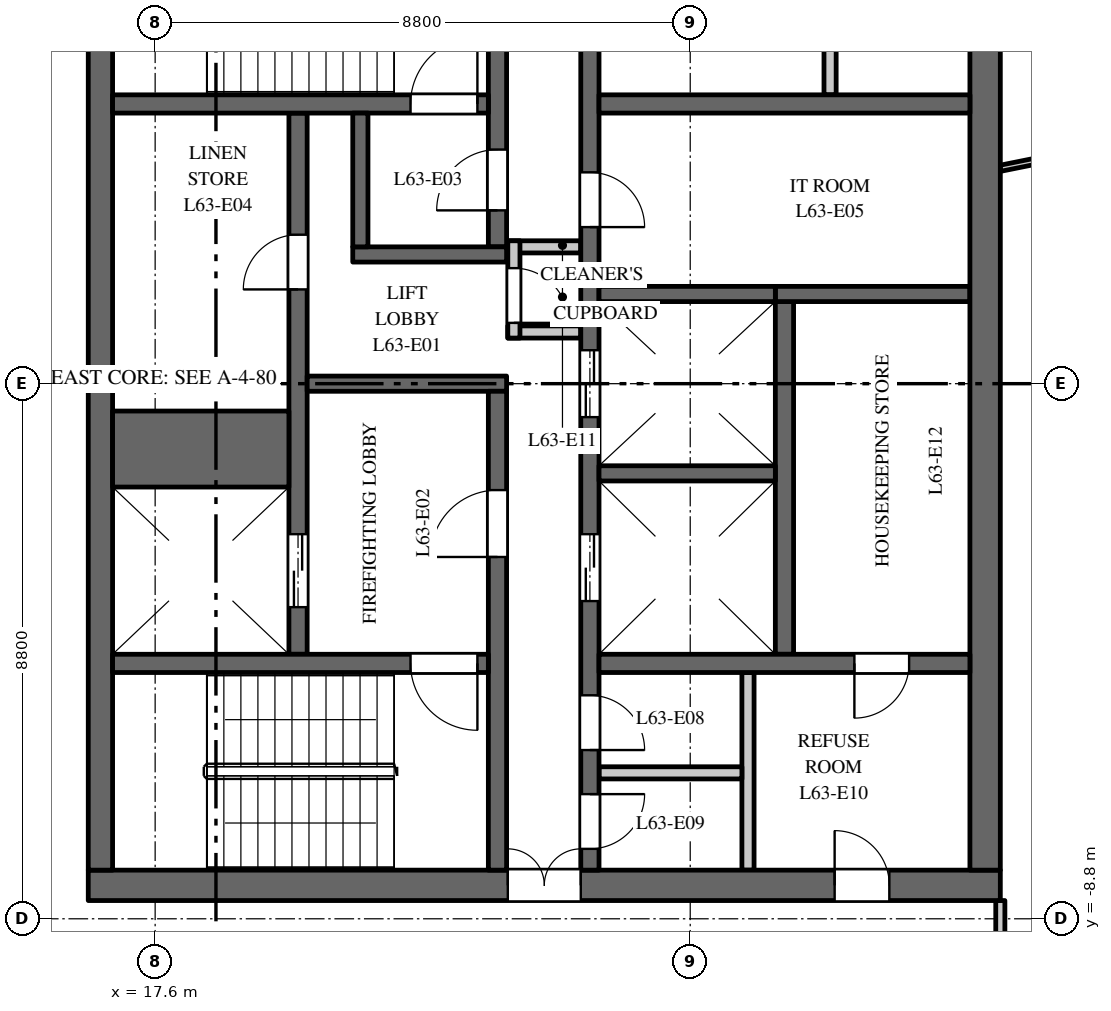
"""IFC4 building model, lengths in metres.
Left out: names, types, materials, properties, quantities, classifications, styles, units other than length and angle.
Written with IfcOpenShell. Run it as: python <this file> out.ifc"""

import sys

from ifc_helpers import new_model, si_unit, direction, frame, frame_2d, origin, place, context, subcontext, project, spatial, rectangle, extrude, element, fill, save


model = new_model("IFC4")
c1 = context("Model", 3, precision=1e-05, world=origin(), true_north=direction((0.0, 1.0)))
c2 = subcontext(c1, "Body", "Model", "MODEL_VIEW")
j1 = project(units=[si_unit("LENGTHUNIT", "METRE"), si_unit("PLANEANGLEUNIT", "RADIAN")], contexts=[c1])
p1 = place(None, origin())
s1 = spatial("IfcSite", under=j1, at=p1, CompositionType="ELEMENT")
p2 = place(p1, origin())
s2 = spatial("IfcBuilding", under=s1, at=p2, CompositionType="ELEMENT")
p3 = place(p2, frame((0.0, 0.0, 295.0)))
s3 = spatial("IfcBuildingStorey", under=s2, at=p3, CompositionType="ELEMENT", Elevation=295.0)
p4 = place(p3, frame((16.5, -8.25, 0.0), z_axis=(0.0, 0.0, 1.0), x_axis=(1.0, 0.0, 0.0)))
e1 = element("IfcWall", 1, at=p4, inside=s3, PredefinedType="SHEAR", context=c2, shape_type="SweptSolid", body=[
    extrude(rectangle(XDim=15.0, YDim=0.5, at=frame_2d((7.5, 0.0))), origin(), (0.0, 0.0, 1.0), 3.7),
])
p5 = place(p4, frame((6.9, 0.0, 0.0)))
e2 = element("IfcOpeningElement", 2, at=p5, cuts=e1, PredefinedType="OPENING", context=c2, shape_type="SweptSolid", body=[
    extrude(rectangle(XDim=1.2, YDim=2.1, at=frame_2d((0.6, 1.05))), frame((0.0, 0.26, 0.0), z_axis=(0.0, -1.0, 0.0), x_axis=(1.0, 0.0, 0.0)), (0.0, 0.0, 1.0), 0.52),
])
p6 = place(p4, frame((12.275, 0.0, 0.0)))
e3 = element("IfcOpeningElement", 3, at=p6, cuts=e1, PredefinedType="OPENING", context=c2, shape_type="SweptSolid", body=[
    extrude(rectangle(XDim=0.9, YDim=2.1, at=frame_2d((0.45, 1.05))), frame((0.0, 0.26, 0.0), z_axis=(0.0, -1.0, 0.0), x_axis=(1.0, 0.0, 0.0)), (0.0, 0.0, 1.0), 0.52),
])
p7 = place(p3, frame((27.95, -4.45, 0.0), z_axis=(0.0, 0.0, 1.0), x_axis=(0.0, 1.0, 0.0)))
e4 = element("IfcWall", 4, at=p7, inside=s3, PredefinedType="SHEAR", context=c2, shape_type="SweptSolid", body=[
    extrude(rectangle(XDim=5.8, YDim=0.3, at=frame_2d((2.9, 0.0))), origin(), (0.0, 0.0, 1.0), 3.7),
])
p8 = place(p3, frame((27.8, 1.475, 0.0), z_axis=(0.0, 0.0, 1.0), x_axis=(1.0, 0.0, 0.0)))
e5 = element("IfcWall", 5, at=p8, inside=s3, PredefinedType="SHEAR", context=c2, shape_type="SweptSolid", body=[
    extrude(rectangle(XDim=3.2, YDim=0.25, at=frame_2d((1.6, 0.0))), origin(), (0.0, 0.0, 1.0), 3.7),
])
p9 = place(p3, frame((19.95, -4.45, 0.0), z_axis=(0.0, 0.0, 1.0), x_axis=(0.0, 1.0, 0.0)))
e6 = element("IfcWall", 6, at=p9, inside=s3, PredefinedType="SHEAR", context=c2, shape_type="SweptSolid", body=[
    extrude(rectangle(XDim=8.9, YDim=0.3, at=frame_2d((4.45, 0.0))), origin(), (0.0, 0.0, 1.0), 3.7),
])
p10 = place(p9, frame((0.775, 0.0, 0.0)))
e7 = element("IfcOpeningElement", 7, at=p10, cuts=e6, PredefinedType="OPENING", context=c2, shape_type="SweptSolid", body=[
    extrude(rectangle(XDim=1.2, YDim=2.1, at=frame_2d((0.6, 1.05))), frame((0.0, 0.16, 0.0), z_axis=(0.0, -1.0, 0.0), x_axis=(1.0, 0.0, 0.0)), (0.0, 0.0, 1.0), 0.32),
])
p11 = place(p9, frame((6.0, 0.0, 0.0)))
e8 = element("IfcOpeningElement", 8, at=p11, cuts=e6, PredefinedType="OPENING", context=c2, shape_type="SweptSolid", body=[
    extrude(rectangle(XDim=0.9, YDim=2.1, at=frame_2d((0.45, 1.05))), frame((0.0, 0.16, 0.0), z_axis=(0.0, -1.0, 0.0), x_axis=(1.0, 0.0, 0.0)), (0.0, 0.0, 1.0), 0.32),
])
p12 = place(p3, frame((24.75, -8.0, 0.0), z_axis=(0.0, 0.0, 1.0), x_axis=(0.0, 1.0, 0.0)))
e9 = element("IfcWall", 9, at=p12, inside=s3, PredefinedType="SHEAR", context=c2, shape_type="SweptSolid", body=[
    extrude(rectangle(XDim=16.0, YDim=0.3, at=frame_2d((8.0, 0.0))), origin(), (0.0, 0.0, 1.0), 3.7),
])
p13 = place(p12, frame((4.425, 0.0, 0.0)))
e10 = element("IfcOpeningElement", 10, at=p13, cuts=e9, PredefinedType="OPENING", context=c2, shape_type="SweptSolid", body=[
    extrude(rectangle(XDim=1.1, YDim=2.1, at=frame_2d((0.55, 1.05))), frame((0.0, 0.16, 0.0), z_axis=(0.0, -1.0, 0.0), x_axis=(1.0, 0.0, 0.0)), (0.0, 0.0, 1.0), 0.32),
])
p14 = place(p12, frame((7.45, 0.0, 0.0)))
e11 = element("IfcOpeningElement", 11, at=p14, cuts=e9, PredefinedType="OPENING", context=c2, shape_type="SweptSolid", body=[
    extrude(rectangle(XDim=1.1, YDim=2.1, at=frame_2d((0.55, 1.05))), frame((0.0, 0.16, 0.0), z_axis=(0.0, -1.0, 0.0), x_axis=(1.0, 0.0, 0.0)), (0.0, 0.0, 1.0), 0.32),
])
p15 = place(p12, frame((10.575, 0.0, 0.0)))
e12 = element("IfcOpeningElement", 12, at=p15, cuts=e9, PredefinedType="OPENING", context=c2, shape_type="SweptSolid", body=[
    extrude(rectangle(XDim=0.9, YDim=2.1, at=frame_2d((0.45, 1.05))), frame((0.0, 0.16, 0.0), z_axis=(0.0, -1.0, 0.0), x_axis=(1.0, 0.0, 0.0)), (0.0, 0.0, 1.0), 0.32),
])
p16 = place(p12, frame((13.75, 0.0, 0.0)))
e13 = element("IfcOpeningElement", 13, at=p16, cuts=e9, PredefinedType="OPENING", context=c2, shape_type="SweptSolid", body=[
    extrude(rectangle(XDim=0.9, YDim=2.1, at=frame_2d((0.45, 1.05))), frame((0.0, 0.16, 0.0), z_axis=(0.0, -1.0, 0.0), x_axis=(1.0, 0.0, 0.0)), (0.0, 0.0, 1.0), 0.32),
])
p17 = place(p12, frame((1.975, 0.0, 0.0)))
e14 = element("IfcOpeningElement", 14, at=p17, cuts=e9, PredefinedType="OPENING", context=c2, shape_type="SweptSolid", body=[
    extrude(rectangle(XDim=0.9, YDim=2.1, at=frame_2d((0.45, 1.05))), frame((0.0, 0.16, 0.0), z_axis=(0.0, -1.0, 0.0), x_axis=(1.0, 0.0, 0.0)), (0.0, 0.0, 1.0), 0.32),
])
p18 = place(p12, frame((0.35, 0.0, 0.0)))
e15 = element("IfcOpeningElement", 15, at=p18, cuts=e9, PredefinedType="OPENING", context=c2, shape_type="SweptSolid", body=[
    extrude(rectangle(XDim=0.9, YDim=2.1, at=frame_2d((0.45, 1.05))), frame((0.0, 0.16, 0.0), z_axis=(0.0, -1.0, 0.0), x_axis=(1.0, 0.0, 0.0)), (0.0, 0.0, 1.0), 0.32),
])
p19 = place(p3, frame((20.1, 0.0, 0.0), z_axis=(0.0, 0.0, 1.0), x_axis=(1.0, 0.0, 0.0)))
e16 = element("IfcWall", 16, at=p19, inside=s3, PredefinedType="SHEAR", context=c2, shape_type="SweptSolid", body=[
    extrude(rectangle(XDim=3.28, YDim=0.25, at=frame_2d((1.64, 0.0))), origin(), (0.0, 0.0, 1.0), 3.7),
])
p20 = place(p3, frame((16.7, -8.0, 0.0), z_axis=(0.0, 0.0, 1.0), x_axis=(0.0, 1.0, 0.0)))
e17 = element("IfcWall", 17, at=p20, inside=s3, PredefinedType="SHEAR", context=c2, shape_type="SweptSolid", body=[
    extrude(rectangle(XDim=16.0, YDim=0.4, at=frame_2d((8.0, 0.0))), origin(), (0.0, 0.0, 1.0), 3.7),
])
for number, where, z_axis, x_axis in (
    (18, (23.4, 0.85, 0.0), (0.0, 0.0, 1.0), (1.0, 0.0, 0.0)),
    (19, (23.4, 2.25, 0.0), (0.0, 0.0, 1.0), (1.0, 0.0, 0.0)),
):
    element("IfcWall", number, at=place(p3, frame(where, z_axis=z_axis, x_axis=x_axis)), inside=s3, PredefinedType="PARTITIONING", context=c2, shape_type="SweptSolid", body=[
        extrude(rectangle(XDim=1.2, YDim=0.2, at=frame_2d((0.6, 0.0))), origin(), (0.0, 0.0, 1.0), 3.7),
    ])
p21 = place(p3, frame((23.5, 0.75, 0.0), z_axis=(0.0, 0.0, 1.0), x_axis=(0.0, 1.0, 0.0)))
e20 = element("IfcWall", 20, at=p21, inside=s3, PredefinedType="PARTITIONING", context=c2, shape_type="SweptSolid", body=[
    extrude(rectangle(XDim=1.6, YDim=0.2, at=frame_2d((0.8, 0.0))), origin(), (0.0, 0.0, 1.0), 3.7),
])
p22 = place(p21, frame((0.25, 0.0, 0.0)))
e21 = element("IfcOpeningElement", 21, at=p22, cuts=e20, PredefinedType="OPENING", context=c2, shape_type="SweptSolid", body=[
    extrude(rectangle(XDim=0.9, YDim=2.1, at=frame_2d((0.45, 1.05))), frame((0.0, 0.11, 0.0), z_axis=(0.0, -1.0, 0.0), x_axis=(1.0, 0.0, 0.0)), (0.0, 0.0, 1.0), 0.22),
])
p23 = place(p3, frame((31.25, -8.0, 0.0), z_axis=(0.0, 0.0, 1.0), x_axis=(0.0, 1.0, 0.0)))
e22 = element("IfcWall", 22, at=p23, inside=s3, PredefinedType="SHEAR", context=c2, shape_type="SweptSolid", body=[
    extrude(rectangle(XDim=16.0, YDim=0.5, at=frame_2d((8.0, 0.0))), origin(), (0.0, 0.0, 1.0), 3.7),
])
p24 = place(p3, frame((24.9, 4.6, 0.0), z_axis=(0.0, 0.0, 1.0), x_axis=(1.0, 0.0, 0.0)))
e23 = element("IfcWall", 23, at=p24, inside=s3, PredefinedType="SHEAR", context=c2, shape_type="SweptSolid", body=[
    extrude(rectangle(XDim=6.1, YDim=0.3, at=frame_2d((3.05, 0.0))), origin(), (0.0, 0.0, 1.0), 3.7),
])
for number, where, z_axis, x_axis in (
    (24, (28.7, 4.75, 0.0), (0.0, 0.0, 1.0), (0.0, 1.0, 0.0)),
    (25, (27.35, -8.0, 0.0), (0.0, 0.0, 1.0), (0.0, 1.0, 0.0)),
):
    element("IfcWall", number, at=place(p3, frame(where, z_axis=z_axis, x_axis=x_axis)), inside=s3, PredefinedType="PARTITIONING", context=c2, shape_type="SweptSolid", body=[
        extrude(rectangle(XDim=3.25, YDim=0.2, at=frame_2d((1.625, 0.0))), origin(), (0.0, 0.0, 1.0), 3.7),
    ])
p25 = place(p3, frame((24.9, -6.4, 0.0), z_axis=(0.0, 0.0, 1.0), x_axis=(1.0, 0.0, 0.0)))
e26 = element("IfcWall", 26, at=p25, inside=s3, PredefinedType="PARTITIONING", context=c2, shape_type="SweptSolid", body=[
    extrude(rectangle(XDim=2.35, YDim=0.2, at=frame_2d((1.175, 0.0))), origin(), (0.0, 0.0, 1.0), 3.7),
])
p26 = place(p3, frame((24.9, -4.6, 0.0), z_axis=(0.0, 0.0, 1.0), x_axis=(1.0, 0.0, 0.0)))
e27 = element("IfcWall", 27, at=p26, inside=s3, PredefinedType="SHEAR", context=c2, shape_type="SweptSolid", body=[
    extrude(rectangle(XDim=6.1, YDim=0.3, at=frame_2d((3.05, 0.0))), origin(), (0.0, 0.0, 1.0), 3.7),
])
p27 = place(p26, frame((4.2, 0.0, 0.0)))
e28 = element("IfcOpeningElement", 28, at=p27, cuts=e27, PredefinedType="OPENING", context=c2, shape_type="SweptSolid", body=[
    extrude(rectangle(XDim=0.9, YDim=2.1, at=frame_2d((0.45, 1.05))), frame((0.0, 0.16, 0.0), z_axis=(0.0, -1.0, 0.0), x_axis=(1.0, 0.0, 0.0)), (0.0, 0.0, 1.0), 0.32),
])
p28 = place(p3, frame((16.9, -1.075, 0.0), z_axis=(0.0, 0.0, 1.0), x_axis=(1.0, 0.0, 0.0)))
e29 = element("IfcWall", 29, at=p28, inside=s3, PredefinedType="SHEAR", context=c2, shape_type="SweptSolid", body=[
    extrude(rectangle(XDim=2.9, YDim=1.25, at=frame_2d((1.45, 0.0))), origin(), (0.0, 0.0, 1.0), 3.7),
])
for number, where, z_axis, x_axis in (
    (30, (24.9, -1.475, 0.0), (0.0, 0.0, 1.0), (1.0, 0.0, 0.0)),
    (31, (24.9, 1.475, 0.0), (0.0, 0.0, 1.0), (1.0, 0.0, 0.0)),
):
    element("IfcWall", number, at=place(p3, frame(where, z_axis=z_axis, x_axis=x_axis)), inside=s3, PredefinedType="SHEAR", context=c2, shape_type="SweptSolid", body=[
        extrude(rectangle(XDim=2.9, YDim=0.25, at=frame_2d((1.45, 0.0))), origin(), (0.0, 0.0, 1.0), 3.7),
    ])
p29 = place(p3, frame((23.23, 2.25, 0.0), z_axis=(0.0, 0.0, 1.0), x_axis=(0.0, 1.0, 0.0)))
e32 = element("IfcWall", 32, at=p29, inside=s3, PredefinedType="SHEAR", context=c2, shape_type="SweptSolid", body=[
    extrude(rectangle(XDim=5.75, YDim=0.3, at=frame_2d((2.875, 0.0))), origin(), (0.0, 0.0, 1.0), 3.7),
])
p30 = place(p29, frame((0.6, 0.0, 0.0)))
e33 = element("IfcOpeningElement", 33, at=p30, cuts=e32, PredefinedType="OPENING", context=c2, shape_type="SweptSolid", body=[
    extrude(rectangle(XDim=1.0, YDim=2.1, at=frame_2d((0.5, 1.05))), frame((0.0, 0.16, 0.0), z_axis=(0.0, -1.0, 0.0), x_axis=(1.0, 0.0, 0.0)), (0.0, 0.0, 1.0), 0.32),
])
p31 = place(p3, frame((23.23, -8.0, 0.0), z_axis=(0.0, 0.0, 1.0), x_axis=(0.0, 1.0, 0.0)))
e34 = element("IfcWall", 34, at=p31, inside=s3, PredefinedType="SHEAR", context=c2, shape_type="SweptSolid", body=[
    extrude(rectangle(XDim=7.875, YDim=0.3, at=frame_2d((3.938, 0.0))), origin(), (0.0, 0.0, 1.0), 3.7),
])
p32 = place(p31, frame((5.15, 0.0, 0.0)))
e35 = element("IfcOpeningElement", 35, at=p32, cuts=e34, PredefinedType="OPENING", context=c2, shape_type="SweptSolid", body=[
    extrude(rectangle(XDim=1.1, YDim=2.1, at=frame_2d((0.55, 1.05))), frame((0.0, 0.16, 0.0), z_axis=(0.0, -1.0, 0.0), x_axis=(1.0, 0.0, 0.0)), (0.0, 0.0, 1.0), 0.32),
])
p33 = place(p3, frame((16.9, 4.6, 0.0), z_axis=(0.0, 0.0, 1.0), x_axis=(1.0, 0.0, 0.0)))
e36 = element("IfcWall", 36, at=p33, inside=s3, PredefinedType="SHEAR", context=c2, shape_type="SweptSolid", body=[
    extrude(rectangle(XDim=6.18, YDim=0.3, at=frame_2d((3.09, 0.0))), origin(), (0.0, 0.0, 1.0), 3.7),
])
p34 = place(p33, frame((4.9, 0.0, 0.0)))
e37 = element("IfcOpeningElement", 37, at=p34, cuts=e36, PredefinedType="OPENING", context=c2, shape_type="SweptSolid", body=[
    extrude(rectangle(XDim=1.1, YDim=2.1, at=frame_2d((0.55, 1.05))), frame((0.0, 0.16, 0.0), z_axis=(0.0, -1.0, 0.0), x_axis=(1.0, 0.0, 0.0)), (0.0, 0.0, 1.0), 0.32),
])
p35 = place(p3, frame((16.9, -4.6, 0.0), z_axis=(0.0, 0.0, 1.0), x_axis=(1.0, 0.0, 0.0)))
e38 = element("IfcWall", 38, at=p35, inside=s3, PredefinedType="SHEAR", context=c2, shape_type="SweptSolid", body=[
    extrude(rectangle(XDim=6.18, YDim=0.3, at=frame_2d((3.09, 0.0))), origin(), (0.0, 0.0, 1.0), 3.7),
])
p36 = place(p35, frame((4.9, 0.0, 0.0)))
e39 = element("IfcOpeningElement", 39, at=p36, cuts=e38, PredefinedType="OPENING", context=c2, shape_type="SweptSolid", body=[
    extrude(rectangle(XDim=1.1, YDim=2.1, at=frame_2d((0.55, 1.05))), frame((0.0, 0.16, 0.0), z_axis=(0.0, -1.0, 0.0), x_axis=(1.0, 0.0, 0.0)), (0.0, 0.0, 1.0), 0.32),
])
p37 = place(p3, frame((20.85, 2.125, 0.0), z_axis=(0.0, 0.0, 1.0), x_axis=(1.0, 0.0, 0.0)))
e40 = element("IfcWall", 40, at=p37, inside=s3, PredefinedType="SHEAR", context=c2, shape_type="SweptSolid", body=[
    extrude(rectangle(XDim=2.53, YDim=0.25, at=frame_2d((1.265, 0.0))), origin(), (0.0, 0.0, 1.0), 3.7),
])
p38 = place(p3, frame((20.975, 2.25, 0.0), z_axis=(0.0, 0.0, 1.0), x_axis=(0.0, 1.0, 0.0)))
e41 = element("IfcWall", 41, at=p38, inside=s3, PredefinedType="SHEAR", context=c2, shape_type="SweptSolid", body=[
    extrude(rectangle(XDim=2.2, YDim=0.25, at=frame_2d((1.1, 0.0))), origin(), (0.0, 0.0, 1.0), 3.7),
])
p39 = place(p3, frame((31.5, -11.5, 0.0), z_axis=(0.0, 0.0, 1.0), x_axis=(0.0, 1.0, 0.0)))
e42 = element("IfcWall", 42, at=p39, inside=s3, PredefinedType="PARTITIONING", context=c2, shape_type="SweptSolid", body=[
    extrude(rectangle(XDim=3.0, YDim=0.15, at=frame_2d((1.5, 0.0))), origin(), (0.0, 0.0, 1.0), 3.0),
])
p40 = place(p39, frame((0.65, 0.0, 0.0)))
e43 = element("IfcOpeningElement", 43, at=p40, cuts=e42, PredefinedType="OPENING", context=c2, shape_type="SweptSolid", body=[
    extrude(rectangle(XDim=1.0, YDim=2.1, at=frame_2d((0.5, 1.05))), frame((0.0, 0.085, 0.0), z_axis=(0.0, -1.0, 0.0), x_axis=(1.0, 0.0, 0.0)), (0.0, 0.0, 1.0), 0.17),
])
p41 = place(p3, frame((31.5, 3.542, 0.0), z_axis=(0.0, 0.0, 1.0), x_axis=(0.980357474535, 0.197228857227, 0.0)))
e44 = element("IfcWall", 44, at=p41, inside=s3, PredefinedType="PARTITIONING", context=c2, shape_type="SweptSolid", body=[
    extrude(rectangle(XDim=4.092, YDim=0.1, at=frame_2d((2.046, 0.0))), origin(), (0.0, 0.0, 1.0), 3.0),
])
p42 = place(p10, origin())
e45 = element("IfcDoor", 45, at=p42, inside=s3, OperationType="DOUBLE_DOOR_SLIDING", PredefinedType="DOOR", context=c2, shape_type="SweptSolid", body=[
    extrude(rectangle(XDim=1.2, YDim=2.1, at=frame_2d((0.6, 1.05))), frame((0.0, 0.025, 0.0), z_axis=(0.0, -1.0, 0.0), x_axis=(1.0, 0.0, 0.0)), (0.0, 0.0, 1.0), 0.05),
])
fill(e7, e45)
p43 = place(p13, origin())
e46 = element("IfcDoor", 46, at=p43, inside=s3, OperationType="DOUBLE_DOOR_SLIDING", PredefinedType="DOOR", context=c2, shape_type="SweptSolid", body=[
    extrude(rectangle(XDim=1.1, YDim=2.1, at=frame_2d((0.55, 1.05))), frame((0.0, 0.025, 0.0), z_axis=(0.0, -1.0, 0.0), x_axis=(1.0, 0.0, 0.0)), (0.0, 0.0, 1.0), 0.05),
])
fill(e10, e46)
p44 = place(p14, origin())
e47 = element("IfcDoor", 47, at=p44, inside=s3, OperationType="DOUBLE_DOOR_SLIDING", PredefinedType="DOOR", context=c2, shape_type="SweptSolid", body=[
    extrude(rectangle(XDim=1.1, YDim=2.1, at=frame_2d((0.55, 1.05))), frame((0.0, 0.025, 0.0), z_axis=(0.0, -1.0, 0.0), x_axis=(1.0, 0.0, 0.0)), (0.0, 0.0, 1.0), 0.05),
])
fill(e11, e47)
p45 = place(p34, origin())
e48 = element("IfcDoor", 48, at=p45, inside=s3, OperationType="SINGLE_SWING_LEFT", PredefinedType="DOOR", context=c2, shape_type="SweptSolid", body=[
    extrude(rectangle(XDim=1.1, YDim=2.1, at=frame_2d((0.55, 1.05))), frame((0.0, 0.025, 0.0), z_axis=(0.0, -1.0, 0.0), x_axis=(1.0, 0.0, 0.0)), (0.0, 0.0, 1.0), 0.05),
])
fill(e37, e48)
p46 = place(p36, origin())
e49 = element("IfcDoor", 49, at=p46, inside=s3, OperationType="SINGLE_SWING_RIGHT", PredefinedType="DOOR", context=c2, shape_type="SweptSolid", body=[
    extrude(rectangle(XDim=1.1, YDim=2.1, at=frame_2d((0.55, 1.05))), frame((0.0, 0.025, 0.0), z_axis=(0.0, -1.0, 0.0), x_axis=(1.0, 0.0, 0.0)), (0.0, 0.0, 1.0), 0.05),
])
fill(e39, e49)
p47 = place(p32, origin())
e50 = element("IfcDoor", 50, at=p47, inside=s3, OperationType="SINGLE_SWING_RIGHT", PredefinedType="DOOR", context=c2, shape_type="SweptSolid", body=[
    extrude(rectangle(XDim=1.1, YDim=2.1, at=frame_2d((0.55, 1.05))), frame((0.0, 0.025, 0.0), z_axis=(0.0, -1.0, 0.0), x_axis=(1.0, 0.0, 0.0)), (0.0, 0.0, 1.0), 0.05),
])
fill(e35, e50)
p48 = place(p30, origin())
e51 = element("IfcDoor", 51, at=p48, inside=s3, OperationType="SINGLE_SWING_RIGHT", PredefinedType="DOOR", context=c2, shape_type="SweptSolid", body=[
    extrude(rectangle(XDim=1.0, YDim=2.1, at=frame_2d((0.5, 1.05))), frame((0.0, 0.025, 0.0), z_axis=(0.0, -1.0, 0.0), x_axis=(1.0, 0.0, 0.0)), (0.0, 0.0, 1.0), 0.05),
])
fill(e33, e51)
p49 = place(p5, origin())
e52 = element("IfcDoor", 52, at=p49, inside=s3, OperationType="DOUBLE_DOOR_DOUBLE_SWING", PredefinedType="DOOR", context=c2, shape_type="SweptSolid", body=[
    extrude(rectangle(XDim=1.2, YDim=2.1, at=frame_2d((0.6, 1.05))), frame((0.0, 0.025, 0.0), z_axis=(0.0, -1.0, 0.0), x_axis=(1.0, 0.0, 0.0)), (0.0, 0.0, 1.0), 0.05),
])
fill(e2, e52)
p50 = place(p11, origin())
e53 = element("IfcDoor", 53, at=p50, inside=s3, OperationType="SINGLE_SWING_RIGHT", PredefinedType="DOOR", context=c2, shape_type="SweptSolid", body=[
    extrude(rectangle(XDim=0.9, YDim=2.1, at=frame_2d((0.45, 1.05))), frame((0.0, 0.025, 0.0), z_axis=(0.0, -1.0, 0.0), x_axis=(1.0, 0.0, 0.0)), (0.0, 0.0, 1.0), 0.05),
])
fill(e8, e53)
p51 = place(p15, origin())
e54 = element("IfcDoor", 54, at=p51, inside=s3, OperationType="SINGLE_SWING_LEFT", PredefinedType="DOOR", context=c2, shape_type="SweptSolid", body=[
    extrude(rectangle(XDim=0.9, YDim=2.1, at=frame_2d((0.45, 1.05))), frame((0.0, 0.025, 0.0), z_axis=(0.0, -1.0, 0.0), x_axis=(1.0, 0.0, 0.0)), (0.0, 0.0, 1.0), 0.05),
])
fill(e12, e54)
p52 = place(p17, origin())
e55 = element("IfcDoor", 55, at=p52, inside=s3, OperationType="SINGLE_SWING_LEFT", PredefinedType="DOOR", context=c2, shape_type="SweptSolid", body=[
    extrude(rectangle(XDim=0.9, YDim=2.1, at=frame_2d((0.45, 1.05))), frame((0.0, 0.025, 0.0), z_axis=(0.0, -1.0, 0.0), x_axis=(1.0, 0.0, 0.0)), (0.0, 0.0, 1.0), 0.05),
])
fill(e14, e55)
p53 = place(p18, origin())
e56 = element("IfcDoor", 56, at=p53, inside=s3, OperationType="SINGLE_SWING_RIGHT", PredefinedType="DOOR", context=c2, shape_type="SweptSolid", body=[
    extrude(rectangle(XDim=0.9, YDim=2.1, at=frame_2d((0.45, 1.05))), frame((0.0, 0.025, 0.0), z_axis=(0.0, -1.0, 0.0), x_axis=(1.0, 0.0, 0.0)), (0.0, 0.0, 1.0), 0.05),
])
fill(e15, e56)
p54 = place(p6, origin())
e57 = element("IfcDoor", 57, at=p54, inside=s3, OperationType="SINGLE_SWING_RIGHT", PredefinedType="DOOR", context=c2, shape_type="SweptSolid", body=[
    extrude(rectangle(XDim=0.9, YDim=2.1, at=frame_2d((0.45, 1.05))), frame((0.0, 0.025, 0.0), z_axis=(0.0, -1.0, 0.0), x_axis=(1.0, 0.0, 0.0)), (0.0, 0.0, 1.0), 0.05),
])
fill(e3, e57)
p55 = place(p22, origin())
e58 = element("IfcDoor", 58, at=p55, inside=s3, OperationType="SINGLE_SWING_LEFT", PredefinedType="DOOR", context=c2, shape_type="SweptSolid", body=[
    extrude(rectangle(XDim=0.9, YDim=2.1, at=frame_2d((0.45, 1.05))), frame((0.0, 0.025, 0.0), z_axis=(0.0, -1.0, 0.0), x_axis=(1.0, 0.0, 0.0)), (0.0, 0.0, 1.0), 0.05),
])
fill(e21, e58)
p56 = place(p27, origin())
e59 = element("IfcDoor", 59, at=p56, inside=s3, OperationType="SINGLE_SWING_LEFT", PredefinedType="DOOR", context=c2, shape_type="SweptSolid", body=[
    extrude(rectangle(XDim=0.9, YDim=2.1, at=frame_2d((0.45, 1.05))), frame((0.0, 0.025, 0.0), z_axis=(0.0, -1.0, 0.0), x_axis=(1.0, 0.0, 0.0)), (0.0, 0.0, 1.0), 0.05),
])
fill(e28, e59)
save(model, sys.argv[1])
